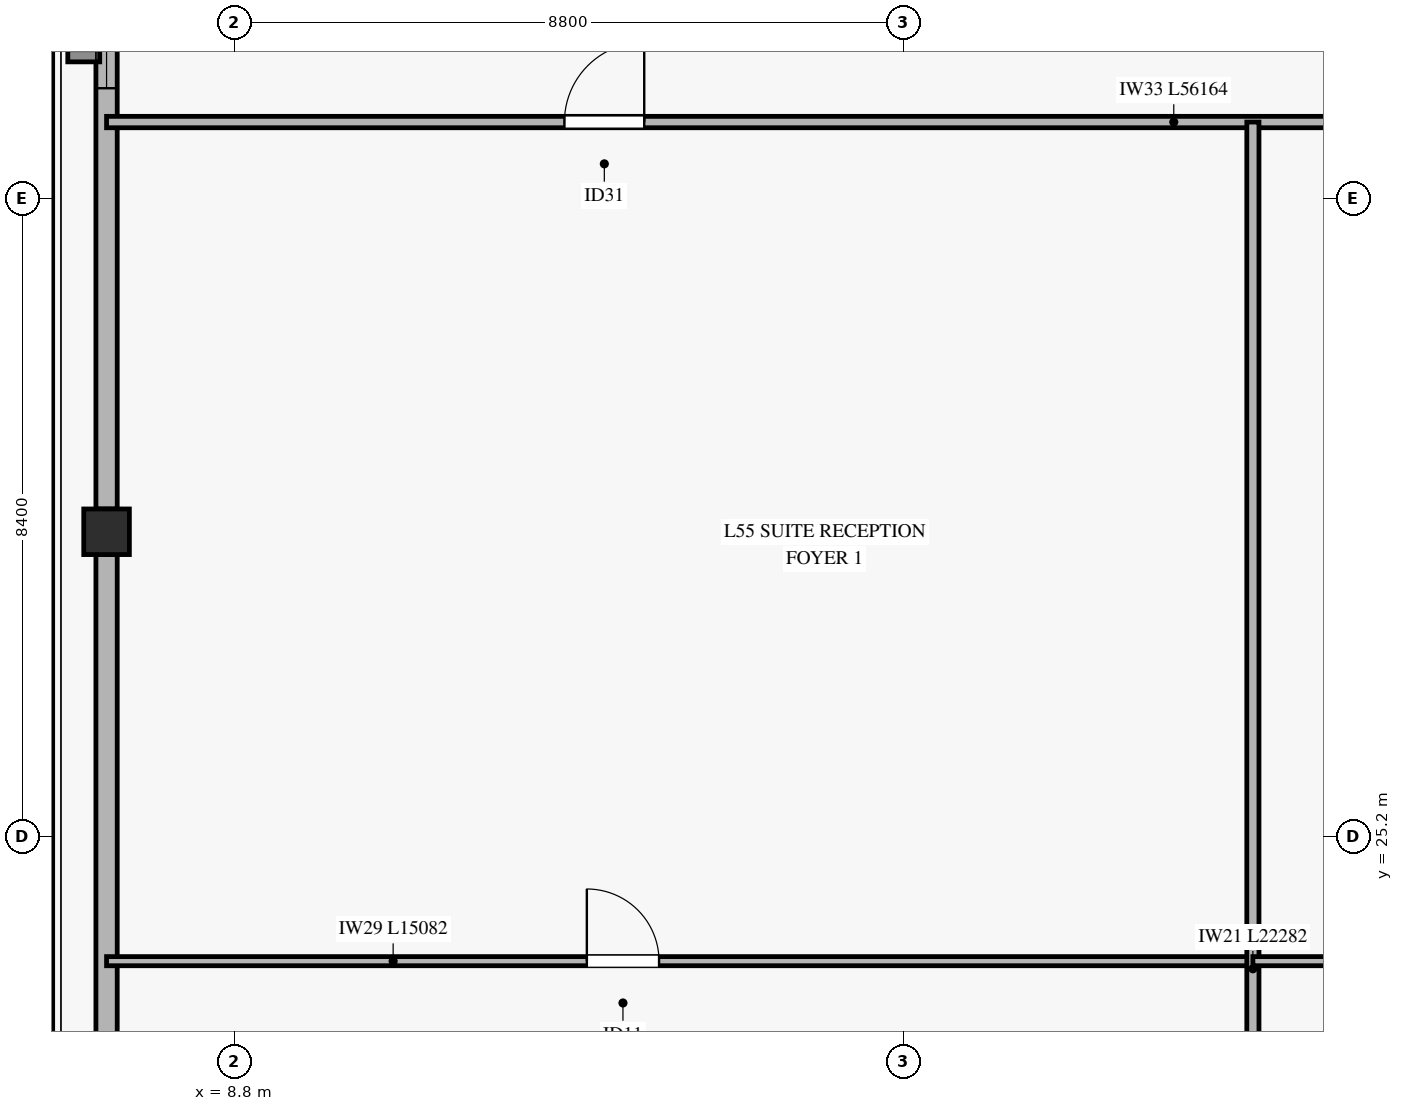
"""IFC4 building model, lengths in metres.
Left out: names, types, materials, properties, quantities, classifications, styles, units other than length and angle.
Written with IfcOpenShell. Run it as: python <this file> out.ifc"""

import sys

from ifc_helpers import new_model, si_unit, direction, frame, frame_2d, origin, origin_2d, place, context, subcontext, project, spatial, rectangle, hollow_rectangle, extrude, source, transform, mapped, element, fill, save


model = new_model("IFC4")
c1 = context("Model", 3, precision=1e-05, world=origin(), true_north=direction((0.0, 1.0)))
c2 = subcontext(c1, "Body", "Model", "MODEL_VIEW")
j1 = project(units=[si_unit("LENGTHUNIT", "METRE"), si_unit("PLANEANGLEUNIT", "RADIAN")], contexts=[c1])
p1 = place(None, origin())
s1 = spatial("IfcSite", under=j1, at=p1, CompositionType="ELEMENT")
p2 = place(p1, origin())
s2 = spatial("IfcBuilding", under=s1, at=p2, CompositionType="ELEMENT")
p3 = place(p2, frame((0.0, 0.0, 216.7)))
s3 = spatial("IfcBuildingStorey", under=s2, at=p3, CompositionType="ELEMENT", Elevation=216.7)
m1 = source(origin(), c2, "Body", "SweptSolid", [
    extrude(hollow_rectangle(XDim=0.6, YDim=0.6, WallThickness=0.028, at=origin_2d()), origin(), (0.0, 0.0, 1.0), 3.24),
])
p4 = place(p3, frame((7.118, 29.209, 0.0), z_axis=(0.0, 0.0, 1.0), x_axis=(1.0, 0.0, 0.0)))
e1 = element("IfcColumn", 1, at=p4, inside=s3, PredefinedType="COLUMN", context=c2, shape_type="MappedRepresentation", body=[
    mapped(m1, transform((0.0, 0.0, 0.0), x_axis=(1.0, 0.0, 0.0), y_axis=(0.0, 1.0, 0.0), z_axis=(0.0, 0.0, 1.0), scale=1.0)),
])
p5 = place(p3, frame((7.118, 15.072, 0.0), z_axis=(0.0, 0.0, 1.0), x_axis=(0.0, 1.0, 0.0)))
e2 = element("IfcWall", 2, at=p5, inside=s3, PredefinedType="SOLIDWALL", context=c2, shape_type="SweptSolid", body=[
    extrude(rectangle(XDim=13.837, YDim=0.28, at=frame_2d((6.918, 0.0))), origin(), (0.0, 0.0, 1.0), 2.72),
])
p6 = place(p5, frame((2.392, 0.0, 0.45)))
e3 = element("IfcOpeningElement", 3, at=p6, cuts=e2, PredefinedType="OPENING", context=c2, shape_type="SweptSolid", body=[
    extrude(rectangle(XDim=2.0, YDim=2.0, at=frame_2d((1.0, 1.0))), frame((0.0, 0.15, 0.0), z_axis=(0.0, -1.0, 0.0), x_axis=(1.0, 0.0, 0.0)), (0.0, 0.0, 1.0), 0.3),
])
p7 = place(p3, frame((7.118, 29.509, 0.0), z_axis=(0.0, 0.0, 1.0), x_axis=(0.0, 1.0, 0.0)))
e4 = element("IfcWall", 4, at=p7, inside=s3, PredefinedType="SOLIDWALL", context=c2, shape_type="SweptSolid", body=[
    extrude(rectangle(XDim=13.837, YDim=0.28, at=frame_2d((6.918, 0.0))), origin(), (0.0, 0.0, 1.0), 2.72),
])
p8 = place(p7, frame((5.536, 0.0, 0.45)))
e5 = element("IfcOpeningElement", 5, at=p8, cuts=e4, PredefinedType="OPENING", context=c2, shape_type="SweptSolid", body=[
    extrude(rectangle(XDim=2.0, YDim=2.0, at=frame_2d((1.0, 1.0))), frame((0.0, 0.15, 0.0), z_axis=(0.0, -1.0, 0.0), x_axis=(1.0, 0.0, 0.0)), (0.0, 0.0, 1.0), 0.3),
])
p9 = place(p3, frame((7.118, 34.6, 0.0), z_axis=(0.0, 0.0, 1.0), x_axis=(1.0, 0.0, 0.0)))
e6 = element("IfcWall", 6, at=p9, inside=s3, PredefinedType="PARTITIONING", context=c2, shape_type="SweptSolid", body=[
    extrude(rectangle(XDim=56.164, YDim=0.15, at=frame_2d((28.082, 0.0))), origin(), (0.0, 0.0, 1.0), 2.425),
])
p10 = place(p9, frame((6.024, 0.0, 0.0)))
e7 = element("IfcOpeningElement", 7, at=p10, cuts=e6, PredefinedType="OPENING", context=c2, shape_type="SweptSolid", body=[
    extrude(rectangle(XDim=1.05, YDim=2.15, at=frame_2d((0.525, 1.075))), frame((0.0, 0.085, 0.0), z_axis=(0.0, -1.0, 0.0), x_axis=(1.0, 0.0, 0.0)), (0.0, 0.0, 1.0), 0.17),
])
p11 = place(p9, frame((17.379, 0.0, 0.0)))
e8 = element("IfcOpeningElement", 8, at=p11, cuts=e6, PredefinedType="OPENING", context=c2, shape_type="SweptSolid", body=[
    extrude(rectangle(XDim=1.05, YDim=2.15, at=frame_2d((0.525, 1.075))), frame((0.0, 0.085, 0.0), z_axis=(0.0, -1.0, 0.0), x_axis=(1.0, 0.0, 0.0)), (0.0, 0.0, 1.0), 0.17),
])
p12 = place(p9, frame((22.751, 0.0, 0.0)))
e9 = element("IfcOpeningElement", 9, at=p12, cuts=e6, PredefinedType="OPENING", context=c2, shape_type="SweptSolid", body=[
    extrude(rectangle(XDim=1.05, YDim=2.15, at=frame_2d((0.525, 1.075))), frame((0.0, 0.085, 0.0), z_axis=(0.0, -1.0, 0.0), x_axis=(1.0, 0.0, 0.0)), (0.0, 0.0, 1.0), 0.17),
])
p13 = place(p9, frame((28.038, 0.0, 0.0)))
e10 = element("IfcOpeningElement", 10, at=p13, cuts=e6, PredefinedType="OPENING", context=c2, shape_type="SweptSolid", body=[
    extrude(rectangle(XDim=1.05, YDim=2.15, at=frame_2d((0.525, 1.075))), frame((0.0, 0.085, 0.0), z_axis=(0.0, -1.0, 0.0), x_axis=(1.0, 0.0, 0.0)), (0.0, 0.0, 1.0), 0.17),
])
p14 = place(p9, frame((33.038, 0.0, 0.0)))
e11 = element("IfcOpeningElement", 11, at=p14, cuts=e6, PredefinedType="OPENING", context=c2, shape_type="SweptSolid", body=[
    extrude(rectangle(XDim=1.05, YDim=2.15, at=frame_2d((0.525, 1.075))), frame((0.0, 0.085, 0.0), z_axis=(0.0, -1.0, 0.0), x_axis=(1.0, 0.0, 0.0)), (0.0, 0.0, 1.0), 0.17),
])
p15 = place(p9, frame((43.558, 0.0, 0.0)))
e12 = element("IfcOpeningElement", 12, at=p15, cuts=e6, PredefinedType="OPENING", context=c2, shape_type="SweptSolid", body=[
    extrude(rectangle(XDim=1.05, YDim=2.15, at=frame_2d((0.525, 1.075))), frame((0.0, 0.085, 0.0), z_axis=(0.0, -1.0, 0.0), x_axis=(1.0, 0.0, 0.0)), (0.0, 0.0, 1.0), 0.17),
])
p16 = place(p3, frame((7.118, 23.559, 0.0), z_axis=(0.0, 0.0, 1.0), x_axis=(1.0, 0.0, 0.0)))
e13 = element("IfcWall", 13, at=p16, inside=s3, PredefinedType="PARTITIONING", context=c2, shape_type="SweptSolid", body=[
    extrude(rectangle(XDim=15.082, YDim=0.12, at=frame_2d((7.541, 0.0))), origin(), (0.0, 0.0, 1.0), 2.425),
])
p17 = place(p16, frame((6.319, 0.0, 0.0)))
e14 = element("IfcOpeningElement", 14, at=p17, cuts=e13, PredefinedType="OPENING", context=c2, shape_type="SweptSolid", body=[
    extrude(rectangle(XDim=0.95, YDim=2.1, at=frame_2d((0.475, 1.05))), frame((0.0, 0.07, 0.0), z_axis=(0.0, -1.0, 0.0), x_axis=(1.0, 0.0, 0.0)), (0.0, 0.0, 1.0), 0.14),
])
p18 = place(p3, frame((22.2, 12.318, 0.0), z_axis=(0.0, 0.0, 1.0), x_axis=(0.0, 1.0, 0.0)))
e15 = element("IfcWall", 15, at=p18, inside=s3, PredefinedType="PARTITIONING", context=c2, shape_type="SweptSolid", body=[
    extrude(rectangle(XDim=22.282, YDim=0.16, at=frame_2d((11.141, 0.0))), origin(), (0.0, 0.0, 1.0), 2.725),
])
p19 = place(p3, frame((22.2, 23.559, 0.0), z_axis=(0.0, 0.0, 1.0), x_axis=(1.0, 0.0, 0.0)))
e16 = element("IfcWall", 16, at=p19, inside=s3, PredefinedType="PARTITIONING", context=c2, shape_type="SweptSolid", body=[
    extrude(rectangle(XDim=5.6, YDim=0.12, at=frame_2d((2.8, 0.0))), origin(), (0.0, 0.0, 1.0), 3.24),
])
p20 = place(p19, frame((2.406, 0.0, 0.0)))
e17 = element("IfcOpeningElement", 17, at=p20, cuts=e16, PredefinedType="OPENING", context=c2, shape_type="SweptSolid", body=[
    extrude(rectangle(XDim=0.95, YDim=2.1, at=frame_2d((0.475, 1.05))), frame((0.0, 0.07, 0.0), z_axis=(0.0, -1.0, 0.0), x_axis=(1.0, 0.0, 0.0)), (0.0, 0.0, 1.0), 0.14),
])
m2 = source(origin(), c2, "Body", "SweptSolid", [
    extrude(rectangle(XDim=2.0, YDim=2.0, at=frame_2d((1.0, 1.0))), frame((0.0, 0.03, 0.0), z_axis=(0.0, -1.0, 0.0), x_axis=(1.0, 0.0, 0.0)), (0.0, 0.0, 1.0), 0.06),
])
p21 = place(p8, origin())
e18 = element("IfcWindow", 18, at=p21, inside=s3, PartitioningType="SINGLE_PANEL", PredefinedType="WINDOW", context=c2, shape_type="MappedRepresentation", body=[
    mapped(m2, transform((0.0, 0.0, 0.0), x_axis=(1.0, 0.0, 0.0), y_axis=(0.0, 1.0, 0.0), z_axis=(0.0, 0.0, 1.0), scale=1.0)),
])
fill(e5, e18)
m3 = source(origin(), c2, "Body", "SweptSolid", [
    extrude(rectangle(XDim=1.05, YDim=2.15, at=frame_2d((0.525, 1.075))), frame((0.0, 0.025, 0.0), z_axis=(0.0, -1.0, 0.0), x_axis=(1.0, 0.0, 0.0)), (0.0, 0.0, 1.0), 0.05),
])
p22 = place(p10, origin())
e19 = element("IfcDoor", 19, at=p22, inside=s3, OperationType="SINGLE_SWING_RIGHT", PredefinedType="DOOR", context=c2, shape_type="MappedRepresentation", body=[
    mapped(m3, transform((0.0, 0.0, 0.0), x_axis=(1.0, 0.0, 0.0), y_axis=(0.0, 1.0, 0.0), z_axis=(0.0, 0.0, 1.0), scale=1.0)),
])
fill(e7, e19)
m4 = source(origin(), c2, "Body", "SweptSolid", [
    extrude(rectangle(XDim=0.95, YDim=2.1, at=frame_2d((0.475, 1.05))), frame((0.0, 0.025, 0.0), z_axis=(0.0, -1.0, 0.0), x_axis=(1.0, 0.0, 0.0)), (0.0, 0.0, 1.0), 0.05),
])
p23 = place(p17, origin())
e20 = element("IfcDoor", 20, at=p23, inside=s3, OperationType="SINGLE_SWING_LEFT", PredefinedType="DOOR", context=c2, shape_type="MappedRepresentation", body=[
    mapped(m4, transform((0.0, 0.0, 0.0), x_axis=(1.0, 0.0, 0.0), y_axis=(0.0, 1.0, 0.0), z_axis=(0.0, 0.0, 1.0), scale=1.0)),
])
fill(e14, e20)
save(model, sys.argv[1])
